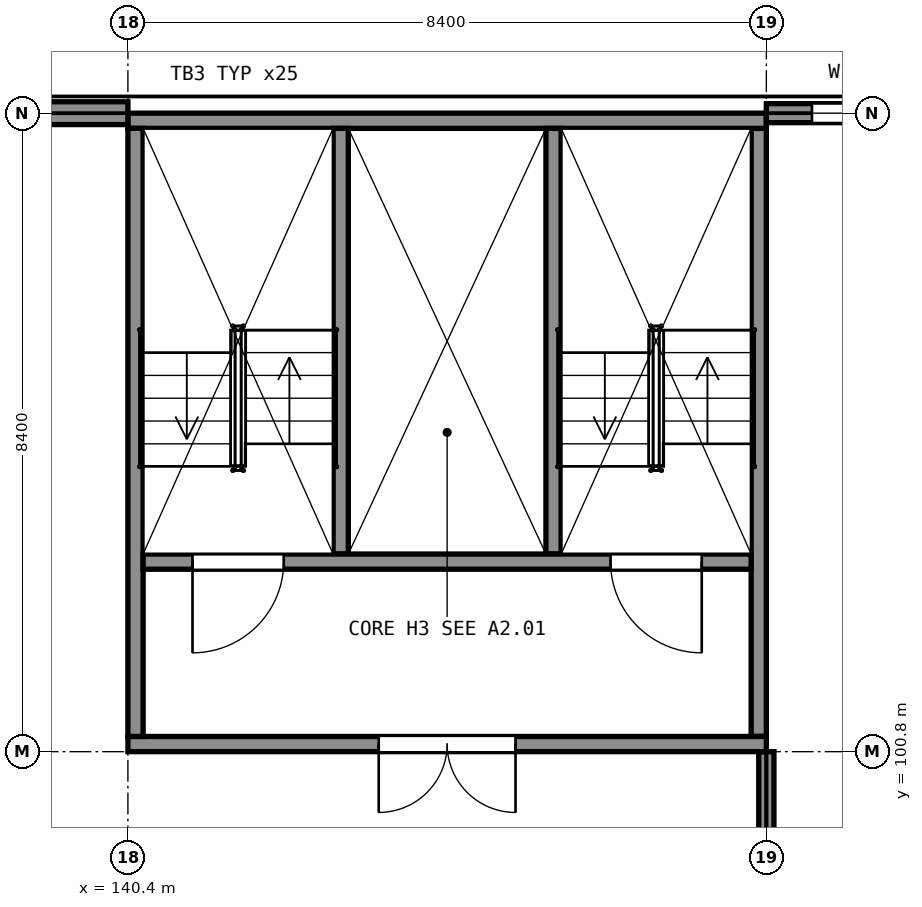
"""IFC4 building model, lengths in metres.
Left out: names, types, materials, properties, quantities, classifications, styles, units other than length and angle.
Written with IfcOpenShell. Run it as: python <this file> out.ifc"""

import sys

from ifc_helpers import new_model, si_unit, direction, frame, frame_2d, origin, place, context, subcontext, project, spatial, rectangle, extrude, element, fill, save


model = new_model("IFC4")
c1 = context("Model", 3, precision=1e-05, world=origin(), true_north=direction((0.0, 1.0)))
c2 = subcontext(c1, "Body", "Model", "MODEL_VIEW")
j1 = project(units=[si_unit("LENGTHUNIT", "METRE"), si_unit("PLANEANGLEUNIT", "RADIAN")], contexts=[c1])
p1 = place(None, origin())
s1 = spatial("IfcSite", under=j1, at=p1, CompositionType="ELEMENT")
p2 = place(p1, origin())
s2 = spatial("IfcBuilding", under=s1, at=p2, CompositionType="ELEMENT")
p3 = place(p2, frame((0.0, 0.0, 5.5)))
s3 = spatial("IfcBuildingStorey", under=s2, at=p3, CompositionType="ELEMENT", Elevation=5.5)
p4 = place(p3, frame((140.4, 100.9, 0.0), z_axis=(0.0, 0.0, 1.0), x_axis=(1.0, 0.0, 0.0)))
e1 = element("IfcWall", 1, at=p4, inside=s3, PredefinedType="SHEAR", context=c2, shape_type="SweptSolid", body=[
    extrude(rectangle(XDim=8.4, YDim=0.2, at=frame_2d((4.2, 0.0))), origin(), (0.0, 0.0, 1.0), 5.0),
])
p5 = place(p4, frame((3.3, 0.0, 0.0)))
e2 = element("IfcOpeningElement", 2, at=p5, cuts=e1, PredefinedType="OPENING", context=c2, shape_type="SweptSolid", body=[
    extrude(rectangle(XDim=1.8, YDim=2.1, at=frame_2d((0.9, 1.05))), frame((0.0, 0.11, 0.0), z_axis=(0.0, -1.0, 0.0), x_axis=(1.0, 0.0, 0.0)), (0.0, 0.0, 1.0), 0.22),
])
p6 = place(p3, frame((140.4, 109.1, 0.0), z_axis=(0.0, 0.0, 1.0), x_axis=(1.0, 0.0, 0.0)))
e3 = element("IfcWall", 3, at=p6, inside=s3, PredefinedType="SHEAR", context=c2, shape_type="SweptSolid", body=[
    extrude(rectangle(XDim=8.4, YDim=0.2, at=frame_2d((4.2, 0.0))), origin(), (0.0, 0.0, 1.0), 5.0),
])
for number, where, z_axis, x_axis in (
    (4, (140.5, 101.0, 0.0), (0.0, 0.0, 1.0), (0.0, 1.0, 0.0)),
    (5, (148.7, 101.0, 0.0), (0.0, 0.0, 1.0), (0.0, 1.0, 0.0)),
):
    element("IfcWall", number, at=place(p3, frame(where, z_axis=z_axis, x_axis=x_axis)), inside=s3, PredefinedType="SHEAR", context=c2, shape_type="SweptSolid", body=[
        extrude(rectangle(XDim=8.0, YDim=0.2, at=frame_2d((4.0, 0.0))), origin(), (0.0, 0.0, 1.0), 5.0),
    ])
p7 = place(p3, frame((140.6, 103.3, 0.0), z_axis=(0.0, 0.0, 1.0), x_axis=(1.0, 0.0, 0.0)))
e6 = element("IfcWall", 6, at=p7, inside=s3, PredefinedType="SHEAR", context=c2, shape_type="SweptSolid", body=[
    extrude(rectangle(XDim=8.0, YDim=0.2, at=frame_2d((4.0, 0.0))), origin(), (0.0, 0.0, 1.0), 5.0),
])
p8 = place(p7, frame((0.65, 0.0, 0.0)))
e7 = element("IfcOpeningElement", 7, at=p8, cuts=e6, PredefinedType="OPENING", context=c2, shape_type="SweptSolid", body=[
    extrude(rectangle(XDim=1.2, YDim=2.1, at=frame_2d((0.6, 1.05))), frame((0.0, 0.11, 0.0), z_axis=(0.0, -1.0, 0.0), x_axis=(1.0, 0.0, 0.0)), (0.0, 0.0, 1.0), 0.22),
])
p9 = place(p7, frame((6.15, 0.0, 0.0)))
e8 = element("IfcOpeningElement", 8, at=p9, cuts=e6, PredefinedType="OPENING", context=c2, shape_type="SweptSolid", body=[
    extrude(rectangle(XDim=1.2, YDim=2.1, at=frame_2d((0.6, 1.05))), frame((0.0, 0.11, 0.0), z_axis=(0.0, -1.0, 0.0), x_axis=(1.0, 0.0, 0.0)), (0.0, 0.0, 1.0), 0.22),
])
for number, where, z_axis, x_axis in (
    (9, (143.2, 103.4, 0.0), (0.0, 0.0, 1.0), (0.0, 1.0, 0.0)),
    (10, (146.0, 103.4, 0.0), (0.0, 0.0, 1.0), (0.0, 1.0, 0.0)),
):
    element("IfcWall", number, at=place(p3, frame(where, z_axis=z_axis, x_axis=x_axis)), inside=s3, PredefinedType="SHEAR", context=c2, shape_type="SweptSolid", body=[
        extrude(rectangle(XDim=5.6, YDim=0.2, at=frame_2d((2.8, 0.0))), origin(), (0.0, 0.0, 1.0), 5.0),
    ])
p10 = place(p3, frame((148.8, 109.2, 0.0), z_axis=(0.0, 0.0, 1.0), x_axis=(1.0, 0.0, 0.0)))
e11 = element("IfcWall", 11, at=p10, inside=s3, PredefinedType="SOLIDWALL", context=c2, shape_type="SweptSolid", body=[
    extrude(rectangle(XDim=8.0, YDim=0.25, at=frame_2d((4.0, 0.0))), origin(), (0.0, 0.0, 1.0), 3.94),
])
p11 = place(p10, frame((0.6, 0.0, 0.9)))
e12 = element("IfcOpeningElement", 12, at=p11, cuts=e11, PredefinedType="OPENING", context=c2, shape_type="SweptSolid", body=[
    extrude(rectangle(XDim=1.2, YDim=2.1, at=frame_2d((0.6, 1.05))), frame((0.0, 0.135, 0.0), z_axis=(0.0, -1.0, 0.0), x_axis=(1.0, 0.0, 0.0)), (0.0, 0.0, 1.0), 0.27),
])
p12 = place(p10, frame((2.85, 0.0, 0.9)))
e13 = element("IfcOpeningElement", 13, at=p12, cuts=e11, PredefinedType="OPENING", context=c2, shape_type="SweptSolid", body=[
    extrude(rectangle(XDim=1.2, YDim=2.1, at=frame_2d((0.6, 1.05))), frame((0.0, 0.135, 0.0), z_axis=(0.0, -1.0, 0.0), x_axis=(1.0, 0.0, 0.0)), (0.0, 0.0, 1.0), 0.27),
])
p13 = place(p10, frame((6.2, 0.0, 0.9)))
e14 = element("IfcOpeningElement", 14, at=p13, cuts=e11, PredefinedType="OPENING", context=c2, shape_type="SweptSolid", body=[
    extrude(rectangle(XDim=1.2, YDim=2.1, at=frame_2d((0.6, 1.05))), frame((0.0, 0.135, 0.0), z_axis=(0.0, -1.0, 0.0), x_axis=(1.0, 0.0, 0.0)), (0.0, 0.0, 1.0), 0.27),
])
p14 = place(p3, frame((132.0, 109.2, 0.0), z_axis=(0.0, 0.0, 1.0), x_axis=(1.0, 0.0, 0.0)))
e15 = element("IfcWall", 15, at=p14, inside=s3, PredefinedType="SOLIDWALL", context=c2, shape_type="SweptSolid", body=[
    extrude(rectangle(XDim=8.4, YDim=0.3, at=frame_2d((4.2, 0.0))), origin(), (0.0, 0.0, 1.0), 3.94),
])
p15 = place(p3, frame((148.8, 92.8, 0.0), z_axis=(0.0, 0.0, 1.0), x_axis=(0.0, 1.0, 0.0)))
e16 = element("IfcWall", 16, at=p15, inside=s3, PredefinedType="PARTITIONING", context=c2, shape_type="SweptSolid", body=[
    extrude(rectangle(XDim=8.0, YDim=0.2, at=frame_2d((4.0, 0.0))), origin(), (0.0, 0.0, 1.0), 3.9),
])
p16 = place(p15, frame((4.575, 0.0, 0.0)))
e17 = element("IfcOpeningElement", 17, at=p16, cuts=e16, PredefinedType="OPENING", context=c2, shape_type="SweptSolid", body=[
    extrude(rectangle(XDim=2.4, YDim=2.4, at=frame_2d((1.2, 1.2))), frame((0.0, 0.11, 0.0), z_axis=(0.0, -1.0, 0.0), x_axis=(1.0, 0.0, 0.0)), (0.0, 0.0, 1.0), 0.22),
])
p17 = place(p11, origin())
e18 = element("IfcWindow", 18, at=p17, inside=s3, PartitioningType="SINGLE_PANEL", PredefinedType="WINDOW", context=c2, shape_type="SweptSolid", body=[
    extrude(rectangle(XDim=1.2, YDim=2.1, at=frame_2d((0.6, 1.05))), frame((0.0, -0.045, 0.0), z_axis=(0.0, -1.0, 0.0), x_axis=(1.0, 0.0, 0.0)), (0.0, 0.0, 1.0), 0.06),
])
fill(e12, e18)
p18 = place(p5, origin())
e19 = element("IfcDoor", 19, at=p18, inside=s3, OperationType="DOUBLE_DOOR_SINGLE_SWING", PredefinedType="DOOR", context=c2, shape_type="SweptSolid", body=[
    extrude(rectangle(XDim=1.8, YDim=2.1, at=frame_2d((0.9, 1.05))), frame((0.0, 0.025, 0.0), z_axis=(0.0, -1.0, 0.0), x_axis=(1.0, 0.0, 0.0)), (0.0, 0.0, 1.0), 0.05),
])
fill(e2, e19)
p19 = place(p8, origin())
e20 = element("IfcDoor", 20, at=p19, inside=s3, OperationType="SINGLE_SWING_LEFT", PredefinedType="DOOR", context=c2, shape_type="SweptSolid", body=[
    extrude(rectangle(XDim=1.2, YDim=2.1, at=frame_2d((0.6, 1.05))), frame((0.0, 0.025, 0.0), z_axis=(0.0, -1.0, 0.0), x_axis=(1.0, 0.0, 0.0)), (0.0, 0.0, 1.0), 0.05),
])
fill(e7, e20)
p20 = place(p9, origin())
e21 = element("IfcDoor", 21, at=p20, inside=s3, OperationType="SINGLE_SWING_RIGHT", PredefinedType="DOOR", context=c2, shape_type="SweptSolid", body=[
    extrude(rectangle(XDim=1.2, YDim=2.1, at=frame_2d((0.6, 1.05))), frame((0.0, 0.025, 0.0), z_axis=(0.0, -1.0, 0.0), x_axis=(1.0, 0.0, 0.0)), (0.0, 0.0, 1.0), 0.05),
])
fill(e8, e21)
save(model, sys.argv[1])
